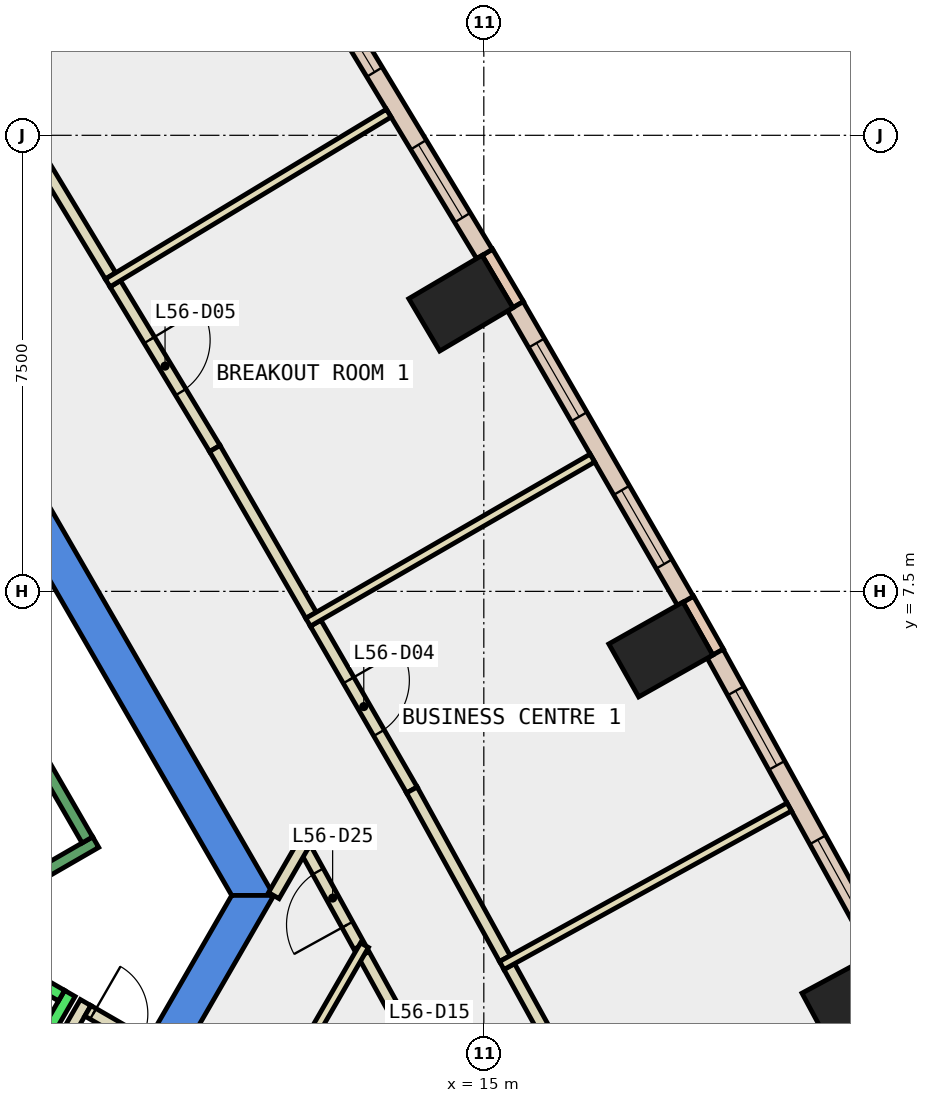
"""IFC4 building model, lengths in metres.
Left out: names, types, materials, properties, quantities, classifications, styles, units other than length and angle.
Written with IfcOpenShell. Run it as: python <this file> out.ifc"""

import sys

from ifc_helpers import new_model, si_unit, direction, frame, frame_2d, origin, origin_2d, place, context, subcontext, project, spatial, polyline, rectangle, outline, extrude, element, fill, save


model = new_model("IFC4")
c1 = context("Model", 3, precision=1e-05, world=origin(), true_north=direction((0.0, 1.0)))
c2 = subcontext(c1, "Body", "Model", "MODEL_VIEW")
j1 = project(units=[si_unit("LENGTHUNIT", "METRE"), si_unit("PLANEANGLEUNIT", "RADIAN")], contexts=[c1])
p1 = place(None, origin())
s1 = spatial("IfcSite", under=j1, at=p1, CompositionType="ELEMENT")
p2 = place(p1, origin())
s2 = spatial("IfcBuilding", under=s1, at=p2, CompositionType="ELEMENT")
p3 = place(p2, frame((0.0, 0.0, 248.6)))
s3 = spatial("IfcBuildingStorey", under=s2, at=p3, CompositionType="ELEMENT", Elevation=248.6)
for number, where, z_axis, x_axis in (
    (1, (21.086, 0.784, -0.34), (0.0, 0.0, 1.0), (-0.474, 0.881, 0.0)),
    (2, (17.911, 6.544, -0.34), (0.0, 0.0, 1.0), (-0.491, 0.871, 0.0)),
    (3, (14.623, 12.239, -0.34), (0.0, 0.0, 1.0), (-0.509, 0.861, 0.0)),
):
    element("IfcColumn", number, at=place(p3, frame(where, z_axis=z_axis, x_axis=x_axis)), inside=s3, PredefinedType="COLUMN", context=c2, shape_type="SweptSolid", body=[
        extrude(rectangle(XDim=1.0, YDim=1.4, at=origin_2d()), origin(), (0.0, 0.0, 1.0), 3.6),
    ])
p4 = place(p3, frame((0.0, 0.0, -0.34)))
e4 = element("IfcWall", 4, at=p4, inside=s3, PredefinedType="SHEAR", context=c2, shape_type="SweptSolid", body=[
    extrude(outline(polyline([(6.786, 10.747), (6.266, 10.447), (10.854, 2.5), (11.547, 2.5), (6.786, 10.747)])), origin(), (0.0, 0.0, 1.0), 3.6),
])
p5 = place(p3, frame((0.0, 0.0, -0.34)))
e5 = element("IfcWall", 5, at=p5, inside=s3, PredefinedType="SHEAR", context=c2, shape_type="SweptSolid", body=[
    extrude(outline(polyline([(5.774, -7.5), (11.547, 2.5), (10.854, 2.5), (5.427, -6.9), (5.774, -7.5)])), origin(), (0.0, 0.0, 1.0), 3.6),
])
p6 = place(p3, frame((18.854, 6.501, 0.0), z_axis=(0.0, 0.0, 1.0), x_axis=(-0.491743606947, 0.87074004446, 0.0)))
e6 = element("IfcWall", 6, at=p6, inside=s3, PredefinedType="STANDARD", context=c2, shape_type="SweptSolid", body=[
    extrude(rectangle(XDim=1.0, YDim=0.2, at=frame_2d((0.5, 0.0))), origin(), (0.0, 0.0, 1.0), 3.26),
])
p7 = place(p3, frame((15.566, 12.216, 0.0), z_axis=(0.0, 0.0, 1.0), x_axis=(-0.508087253435, 0.86130560366, 0.0)))
e7 = element("IfcWall", 7, at=p7, inside=s3, PredefinedType="STANDARD", context=c2, shape_type="SweptSolid", body=[
    extrude(rectangle(XDim=1.0, YDim=0.2, at=frame_2d((0.5, 0.0))), origin(), (0.0, 0.0, 1.0), 3.26),
])
p8 = place(p3, frame((21.505, 1.577, 0.0), z_axis=(0.0, 0.0, 1.0), x_axis=(-0.482734585173, 0.875766704253, 0.0)))
e8 = element("IfcWall", 8, at=p8, inside=s3, PredefinedType="STANDARD", context=c2, shape_type="SweptSolid", body=[
    extrude(rectangle(XDim=5.593, YDim=0.3, at=frame_2d((2.796, 0.0))), origin(), (0.0, 0.0, 1.0), 3.26),
])
p9 = place(p8, frame((0.698, 0.0, 0.9)))
e9 = element("IfcOpeningElement", 9, at=p9, cuts=e8, PredefinedType="OPENING", context=c2, shape_type="SweptSolid", body=[
    extrude(rectangle(XDim=1.4, YDim=2.0, at=frame_2d((0.7, 1.0))), frame((0.0, 0.16, 0.0), z_axis=(0.0, -1.0, 0.0), x_axis=(1.0, 0.0, 0.0)), (0.0, 0.0, 1.0), 0.32),
])
p10 = place(p8, frame((3.495, 0.0, 0.9)))
e10 = element("IfcOpeningElement", 10, at=p10, cuts=e8, PredefinedType="OPENING", context=c2, shape_type="SweptSolid", body=[
    extrude(rectangle(XDim=1.4, YDim=2.0, at=frame_2d((0.7, 1.0))), frame((0.0, 0.16, 0.0), z_axis=(0.0, -1.0, 0.0), x_axis=(1.0, 0.0, 0.0)), (0.0, 0.0, 1.0), 0.32),
])
p11 = place(p3, frame((18.315, 7.344, 0.0), z_axis=(0.0, 0.0, 1.0), x_axis=(-0.49995037644, 0.866054052065, 0.0)))
e11 = element("IfcWall", 11, at=p11, inside=s3, PredefinedType="STANDARD", context=c2, shape_type="SweptSolid", body=[
    extrude(rectangle(XDim=5.594, YDim=0.3, at=frame_2d((2.797, 0.0))), origin(), (0.0, 0.0, 1.0), 3.26),
])
p12 = place(p11, frame((0.699, 0.0, 0.9)))
e12 = element("IfcOpeningElement", 12, at=p12, cuts=e11, PredefinedType="OPENING", context=c2, shape_type="SweptSolid", body=[
    extrude(rectangle(XDim=1.4, YDim=2.0, at=frame_2d((0.7, 1.0))), frame((0.0, 0.16, 0.0), z_axis=(0.0, -1.0, 0.0), x_axis=(1.0, 0.0, 0.0)), (0.0, 0.0, 1.0), 0.32),
])
p13 = place(p11, frame((3.496, 0.0, 0.9)))
e13 = element("IfcOpeningElement", 13, at=p13, cuts=e11, PredefinedType="OPENING", context=c2, shape_type="SweptSolid", body=[
    extrude(rectangle(XDim=1.4, YDim=2.0, at=frame_2d((0.7, 1.0))), frame((0.0, 0.16, 0.0), z_axis=(0.0, -1.0, 0.0), x_axis=(1.0, 0.0, 0.0)), (0.0, 0.0, 1.0), 0.32),
])
p14 = place(p3, frame((15.011, 13.048, 0.0), z_axis=(0.0, 0.0, 1.0), x_axis=(-0.517169592475, 0.855882943293, 0.0)))
e14 = element("IfcWall", 14, at=p14, inside=s3, PredefinedType="STANDARD", context=c2, shape_type="SweptSolid", body=[
    extrude(rectangle(XDim=5.594, YDim=0.3, at=frame_2d((2.797, 0.0))), origin(), (0.0, 0.0, 1.0), 3.26),
])
p15 = place(p14, frame((0.699, 0.0, 0.9)))
e15 = element("IfcOpeningElement", 15, at=p15, cuts=e14, PredefinedType="OPENING", context=c2, shape_type="SweptSolid", body=[
    extrude(rectangle(XDim=1.4, YDim=2.0, at=frame_2d((0.7, 1.0))), frame((0.0, 0.16, 0.0), z_axis=(0.0, -1.0, 0.0), x_axis=(1.0, 0.0, 0.0)), (0.0, 0.0, 1.0), 0.32),
])
p16 = place(p14, frame((3.496, 0.0, 0.9)))
e16 = element("IfcOpeningElement", 16, at=p16, cuts=e14, PredefinedType="OPENING", context=c2, shape_type="SweptSolid", body=[
    extrude(rectangle(XDim=1.4, YDim=2.0, at=frame_2d((0.7, 1.0))), frame((0.0, 0.16, 0.0), z_axis=(0.0, -1.0, 0.0), x_axis=(1.0, 0.0, 0.0)), (0.0, 0.0, 1.0), 0.32),
])
p17 = place(p3, frame((12.952, 1.661, 0.0), z_axis=(0.0, 0.0, 1.0), x_axis=(-0.482707835392, 0.875781448566, 0.0)))
e17 = element("IfcWall", 17, at=p17, inside=s3, PredefinedType="PARTITIONING", context=c2, shape_type="SweptSolid", body=[
    extrude(rectangle(XDim=1.817, YDim=0.2, at=frame_2d((0.908, 0.0))), origin(), (0.0, 0.0, 1.0), 3.26),
])
p18 = place(p17, frame((0.408, 0.0, 0.0)))
e18 = element("IfcOpeningElement", 18, at=p18, cuts=e17, PredefinedType="OPENING", context=c2, shape_type="SweptSolid", body=[
    extrude(rectangle(XDim=1.0, YDim=2.1, at=frame_2d((0.5, 1.05))), frame((0.0, 0.11, 0.0), z_axis=(0.0, -1.0, 0.0), x_axis=(1.0, 0.0, 0.0)), (0.0, 0.0, 1.0), 0.22),
])
p19 = place(p3, frame((12.079, 3.419, 0.0), z_axis=(0.0, 0.0, 1.0), x_axis=(-0.500674759037, -0.865635480825, 0.0)))
e19 = element("IfcWall", 19, at=p19, inside=s3, PredefinedType="PARTITIONING", context=c2, shape_type="SweptSolid", body=[
    extrude(rectangle(XDim=1.065, YDim=0.2, at=frame_2d((0.532, 0.0))), origin(), (0.0, 0.0, 1.0), 3.26),
])
p20 = place(p3, frame((15.186, -2.391, 0.0), z_axis=(0.0, 0.0, 1.0), x_axis=(-0.482858240592, 0.875698532311, 0.0)))
e20 = element("IfcWall", 20, at=p20, inside=s3, PredefinedType="PARTITIONING", context=c2, shape_type="SweptSolid", body=[
    extrude(rectangle(XDim=4.478, YDim=0.2, at=frame_2d((2.239, 0.0))), origin(), (0.0, 0.0, 1.0), 3.26),
])
p21 = place(p20, frame((1.739, 0.0, 0.0)))
e21 = element("IfcOpeningElement", 21, at=p21, cuts=e20, PredefinedType="OPENING", context=c2, shape_type="SweptSolid", body=[
    extrude(rectangle(XDim=1.0, YDim=2.1, at=frame_2d((0.5, 1.05))), frame((0.0, 0.11, 0.0), z_axis=(0.0, -1.0, 0.0), x_axis=(1.0, 0.0, 0.0)), (0.0, 0.0, 1.0), 0.22),
])
p22 = place(p3, frame((15.418, 1.33, 0.0), z_axis=(0.0, 0.0, 1.0), x_axis=(0.482838875149, -0.875709210095, 0.0)))
e22 = element("IfcWall", 22, at=p22, inside=s3, PredefinedType="PARTITIONING", context=c2, shape_type="SweptSolid", body=[
    extrude(rectangle(XDim=3.167, YDim=0.2, at=frame_2d((1.583, 0.0))), origin(), (0.0, 0.0, 1.0), 3.26),
])
p23 = place(p3, frame((12.234, 6.977, 0.0), z_axis=(0.0, 0.0, 1.0), x_axis=(0.499820325382, -0.866129114125, 0.0)))
e23 = element("IfcWall", 23, at=p23, inside=s3, PredefinedType="PARTITIONING", context=c2, shape_type="SweptSolid", body=[
    extrude(rectangle(XDim=3.167, YDim=0.2, at=frame_2d((1.583, 0.0))), origin(), (0.0, 0.0, 1.0), 3.26),
])
p24 = place(p23, frame((1.084, 0.0, 0.0)))
e24 = element("IfcOpeningElement", 24, at=p24, cuts=e23, PredefinedType="OPENING", context=c2, shape_type="SweptSolid", body=[
    extrude(rectangle(XDim=1.0, YDim=2.1, at=frame_2d((0.5, 1.05))), frame((0.0, 0.11, 0.0), z_axis=(0.0, -1.0, 0.0), x_axis=(1.0, 0.0, 0.0)), (0.0, 0.0, 1.0), 0.22),
])
p25 = place(p3, frame((13.817, 4.234, 0.0), z_axis=(0.0, 0.0, 1.0), x_axis=(0.482871474341, -0.875691235121, 0.0)))
e25 = element("IfcWall", 25, at=p25, inside=s3, PredefinedType="PARTITIONING", context=c2, shape_type="SweptSolid", body=[
    extrude(rectangle(XDim=3.167, YDim=0.2, at=frame_2d((1.583, 0.0))), origin(), (0.0, 0.0, 1.0), 3.26),
])
p26 = place(p3, frame((8.939, 12.559, 0.0), z_axis=(0.0, 0.0, 1.0), x_axis=(0.517045022441, -0.855958202699, 0.0)))
e26 = element("IfcWall", 26, at=p26, inside=s3, PredefinedType="PARTITIONING", context=c2, shape_type="SweptSolid", body=[
    extrude(rectangle(XDim=3.166, YDim=0.2, at=frame_2d((1.583, 0.0))), origin(), (0.0, 0.0, 1.0), 3.26),
])
p27 = place(p26, frame((1.083, 0.0, 0.0)))
e27 = element("IfcOpeningElement", 27, at=p27, cuts=e26, PredefinedType="OPENING", context=c2, shape_type="SweptSolid", body=[
    extrude(rectangle(XDim=1.0, YDim=2.1, at=frame_2d((0.5, 1.05))), frame((0.0, 0.11, 0.0), z_axis=(0.0, -1.0, 0.0), x_axis=(1.0, 0.0, 0.0)), (0.0, 0.0, 1.0), 0.22),
])
p28 = place(p3, frame((10.576, 9.849, 0.0), z_axis=(0.0, 0.0, 1.0), x_axis=(0.499953838557, -0.866052053466, 0.0)))
e28 = element("IfcWall", 28, at=p28, inside=s3, PredefinedType="PARTITIONING", context=c2, shape_type="SweptSolid", body=[
    extrude(rectangle(XDim=3.166, YDim=0.2, at=frame_2d((1.583, 0.0))), origin(), (0.0, 0.0, 1.0), 3.26),
])
p29 = place(p3, frame((7.224, 15.399, 0.0), z_axis=(0.0, 0.0, 1.0), x_axis=(0.51690854001, -0.856040630615, 0.0)))
e29 = element("IfcWall", 29, at=p29, inside=s3, PredefinedType="PARTITIONING", context=c2, shape_type="SweptSolid", body=[
    extrude(rectangle(XDim=3.167, YDim=0.2, at=frame_2d((1.583, 0.0))), origin(), (0.0, 0.0, 1.0), 3.26),
])
p30 = place(p3, frame((5.751, -3.938, 0.0), z_axis=(0.0, 0.0, 1.0), x_axis=(0.500034260056, 0.866005622828, 0.0)))
e30 = element("IfcWall", 30, at=p30, inside=s3, PredefinedType="PARTITIONING", context=c2, shape_type="SweptSolid", body=[
    extrude(rectangle(XDim=5.399, YDim=0.2, at=frame_2d((2.7, 0.0))), origin(), (0.0, 0.0, 1.0), 3.26),
])
p31 = place(p3, frame((8.488, 0.602, 0.0), z_axis=(0.0, 0.0, 1.0), x_axis=(0.866063652425, -0.499933745558, 0.0)))
e31 = element("IfcWall", 31, at=p31, inside=s3, PredefinedType="PARTITIONING", context=c2, shape_type="SweptSolid", body=[
    extrude(rectangle(XDim=1.1, YDim=0.2, at=frame_2d((0.55, 0.0))), origin(), (0.0, 0.0, 1.0), 3.26),
])
p32 = place(p31, frame((0.1, 0.0, 0.0)))
e32 = element("IfcOpeningElement", 32, at=p32, cuts=e31, PredefinedType="OPENING", context=c2, shape_type="SweptSolid", body=[
    extrude(rectangle(XDim=0.9, YDim=2.1, at=frame_2d((0.45, 1.05))), frame((0.0, 0.11, 0.0), z_axis=(0.0, -1.0, 0.0), x_axis=(1.0, 0.0, 0.0)), (0.0, 0.0, 1.0), 0.22),
])
p33 = place(p3, frame((9.358, -4.692, 0.0), z_axis=(0.0, 0.0, 1.0), x_axis=(0.500027777314, 0.866009365951, 0.0)))
e33 = element("IfcWall", 33, at=p33, inside=s3, PredefinedType="PARTITIONING", context=c2, shape_type="SweptSolid", body=[
    extrude(rectangle(XDim=7.36, YDim=0.15, at=frame_2d((3.68, 0.0))), origin(), (0.0, 0.0, 1.0), 3.26),
])
p34 = place(p3, frame((15.295, 1.347, 0.0), z_axis=(0.0, 0.0, 1.0), x_axis=(0.875728645362, 0.482803624358, 0.0)))
e34 = element("IfcWall", 34, at=p34, inside=s3, PredefinedType="PARTITIONING", context=c2, shape_type="SweptSolid", body=[
    extrude(rectangle(XDim=5.4, YDim=0.15, at=frame_2d((2.7, 0.0))), origin(), (0.0, 0.0, 1.0), 3.26),
])
p35 = place(p3, frame((12.11, 6.992, 0.0), z_axis=(0.0, 0.0, 1.0), x_axis=(0.865994316829, 0.50005384032, 0.0)))
e35 = element("IfcWall", 35, at=p35, inside=s3, PredefinedType="PARTITIONING", context=c2, shape_type="SweptSolid", body=[
    extrude(rectangle(XDim=5.399, YDim=0.15, at=frame_2d((2.7, 0.0))), origin(), (0.0, 0.0, 1.0), 3.26),
])
p36 = place(p3, frame((8.814, 12.572, 0.0), z_axis=(0.0, 0.0, 1.0), x_axis=(0.855957229262, 0.517046633945, 0.0)))
e36 = element("IfcWall", 36, at=p36, inside=s3, PredefinedType="PARTITIONING", context=c2, shape_type="SweptSolid", body=[
    extrude(rectangle(XDim=5.4, YDim=0.15, at=frame_2d((2.7, 0.0))), origin(), (0.0, 0.0, 1.0), 3.26),
])
p37 = place(p3, frame((5.492, -3.788, 0.0), z_axis=(0.0, 0.0, 1.0), x_axis=(0.500034260056, 0.866005622828, 0.0)))
e37 = element("IfcWall", 37, at=p37, inside=s3, PredefinedType="STANDARD", context=c2, shape_type="SweptSolid", body=[
    extrude(rectangle(XDim=5.399, YDim=0.2, at=frame_2d((2.7, 0.0))), origin(), (0.0, 0.0, 1.0), 3.26),
])
p38 = place(p3, frame((5.977, 2.052, 0.0), z_axis=(0.0, 0.0, 1.0), x_axis=(0.865973769406, -0.500089422704, 0.0)))
e38 = element("IfcWall", 38, at=p38, inside=s3, PredefinedType="STANDARD", context=c2, shape_type="SweptSolid", body=[
    extrude(rectangle(XDim=2.399, YDim=0.2, at=frame_2d((1.2, 0.0))), origin(), (0.0, 0.0, 1.0), 3.26),
])
p39 = place(p3, frame((4.806, 1.176, 0.0), z_axis=(0.0, 0.0, 1.0), x_axis=(0.866059941101, 0.499940174841, 0.0)))
e39 = element("IfcWall", 39, at=p39, inside=s3, PredefinedType="STANDARD", context=c2, shape_type="SweptSolid", body=[
    extrude(rectangle(XDim=4.4, YDim=0.2, at=frame_2d((2.2, 0.0))), origin(), (0.0, 0.0, 1.0), 3.26),
])
p40 = place(p39, frame((2.4, 0.0, 0.0)))
e40 = element("IfcOpeningElement", 40, at=p40, cuts=e39, PredefinedType="OPENING", context=c2, shape_type="SweptSolid", body=[
    extrude(rectangle(XDim=1.1, YDim=2.2, at=frame_2d((0.55, 1.1))), frame((0.0, 0.11, 0.0), z_axis=(0.0, -1.0, 0.0), x_axis=(1.0, 0.0, 0.0)), (0.0, 0.0, 1.0), 0.22),
])
p41 = place(p3, frame((8.48, 3.412, 0.0), z_axis=(0.0, 0.0, 1.0), x_axis=(-0.499978703459, 0.866037698999, 0.0)))
e41 = element("IfcWall", 41, at=p41, inside=s3, PredefinedType="STANDARD", context=c2, shape_type="SweptSolid", body=[
    extrude(rectangle(XDim=6.9, YDim=0.2, at=frame_2d((3.45, 0.0))), origin(), (0.0, 0.0, 1.0), 3.26),
])
p42 = place(p9, origin())
e42 = element("IfcWindow", 42, at=p42, inside=s3, PartitioningType="SINGLE_PANEL", PredefinedType="WINDOW", context=c2, shape_type="SweptSolid", body=[
    extrude(rectangle(XDim=1.4, YDim=2.0, at=frame_2d((0.7, 1.0))), frame((0.0, 0.03, 0.0), z_axis=(0.0, -1.0, 0.0), x_axis=(1.0, 0.0, 0.0)), (0.0, 0.0, 1.0), 0.06),
])
fill(e9, e42)
p43 = place(p10, origin())
e43 = element("IfcWindow", 43, at=p43, inside=s3, PartitioningType="SINGLE_PANEL", PredefinedType="WINDOW", context=c2, shape_type="SweptSolid", body=[
    extrude(rectangle(XDim=1.4, YDim=2.0, at=frame_2d((0.7, 1.0))), frame((0.0, 0.03, 0.0), z_axis=(0.0, -1.0, 0.0), x_axis=(1.0, 0.0, 0.0)), (0.0, 0.0, 1.0), 0.06),
])
fill(e10, e43)
p44 = place(p12, origin())
e44 = element("IfcWindow", 44, at=p44, inside=s3, PartitioningType="SINGLE_PANEL", PredefinedType="WINDOW", context=c2, shape_type="SweptSolid", body=[
    extrude(rectangle(XDim=1.4, YDim=2.0, at=frame_2d((0.7, 1.0))), frame((0.0, 0.03, 0.0), z_axis=(0.0, -1.0, 0.0), x_axis=(1.0, 0.0, 0.0)), (0.0, 0.0, 1.0), 0.06),
])
fill(e12, e44)
p45 = place(p13, origin())
e45 = element("IfcWindow", 45, at=p45, inside=s3, PartitioningType="SINGLE_PANEL", PredefinedType="WINDOW", context=c2, shape_type="SweptSolid", body=[
    extrude(rectangle(XDim=1.4, YDim=2.0, at=frame_2d((0.7, 1.0))), frame((0.0, 0.03, 0.0), z_axis=(0.0, -1.0, 0.0), x_axis=(1.0, 0.0, 0.0)), (0.0, 0.0, 1.0), 0.06),
])
fill(e13, e45)
p46 = place(p15, origin())
e46 = element("IfcWindow", 46, at=p46, inside=s3, PartitioningType="SINGLE_PANEL", PredefinedType="WINDOW", context=c2, shape_type="SweptSolid", body=[
    extrude(rectangle(XDim=1.4, YDim=2.0, at=frame_2d((0.7, 1.0))), frame((0.0, 0.03, 0.0), z_axis=(0.0, -1.0, 0.0), x_axis=(1.0, 0.0, 0.0)), (0.0, 0.0, 1.0), 0.06),
])
fill(e15, e46)
p47 = place(p16, origin())
e47 = element("IfcWindow", 47, at=p47, inside=s3, PartitioningType="SINGLE_PANEL", PredefinedType="WINDOW", context=c2, shape_type="SweptSolid", body=[
    extrude(rectangle(XDim=1.4, YDim=2.0, at=frame_2d((0.7, 1.0))), frame((0.0, 0.03, 0.0), z_axis=(0.0, -1.0, 0.0), x_axis=(1.0, 0.0, 0.0)), (0.0, 0.0, 1.0), 0.06),
])
fill(e16, e47)
p48 = place(p24, origin())
e48 = element("IfcDoor", 48, at=p48, inside=s3, OperationType="SINGLE_SWING_LEFT", PredefinedType="DOOR", context=c2, shape_type="SweptSolid", body=[
    extrude(rectangle(XDim=1.0, YDim=2.1, at=frame_2d((0.5, 1.05))), frame((0.0, 0.025, 0.0), z_axis=(0.0, -1.0, 0.0), x_axis=(1.0, 0.0, 0.0)), (0.0, 0.0, 1.0), 0.05),
])
fill(e24, e48)
p49 = place(p27, origin())
e49 = element("IfcDoor", 49, at=p49, inside=s3, OperationType="SINGLE_SWING_LEFT", PredefinedType="DOOR", context=c2, shape_type="SweptSolid", body=[
    extrude(rectangle(XDim=1.0, YDim=2.1, at=frame_2d((0.5, 1.05))), frame((0.0, 0.025, 0.0), z_axis=(0.0, -1.0, 0.0), x_axis=(1.0, 0.0, 0.0)), (0.0, 0.0, 1.0), 0.05),
])
fill(e27, e49)
p50 = place(p18, origin())
e50 = element("IfcDoor", 50, at=p50, inside=s3, OperationType="SINGLE_SWING_RIGHT", PredefinedType="DOOR", context=c2, shape_type="SweptSolid", body=[
    extrude(rectangle(XDim=1.0, YDim=2.1, at=frame_2d((0.5, 1.05))), frame((0.0, 0.025, 0.0), z_axis=(0.0, -1.0, 0.0), x_axis=(1.0, 0.0, 0.0)), (0.0, 0.0, 1.0), 0.05),
])
fill(e18, e50)
p51 = place(p32, origin())
e51 = element("IfcDoor", 51, at=p51, inside=s3, OperationType="SINGLE_SWING_RIGHT", PredefinedType="DOOR", context=c2, shape_type="SweptSolid", body=[
    extrude(rectangle(XDim=0.9, YDim=2.1, at=frame_2d((0.45, 1.05))), frame((0.0, 0.025, 0.0), z_axis=(0.0, -1.0, 0.0), x_axis=(1.0, 0.0, 0.0)), (0.0, 0.0, 1.0), 0.05),
])
fill(e32, e51)
save(model, sys.argv[1])
